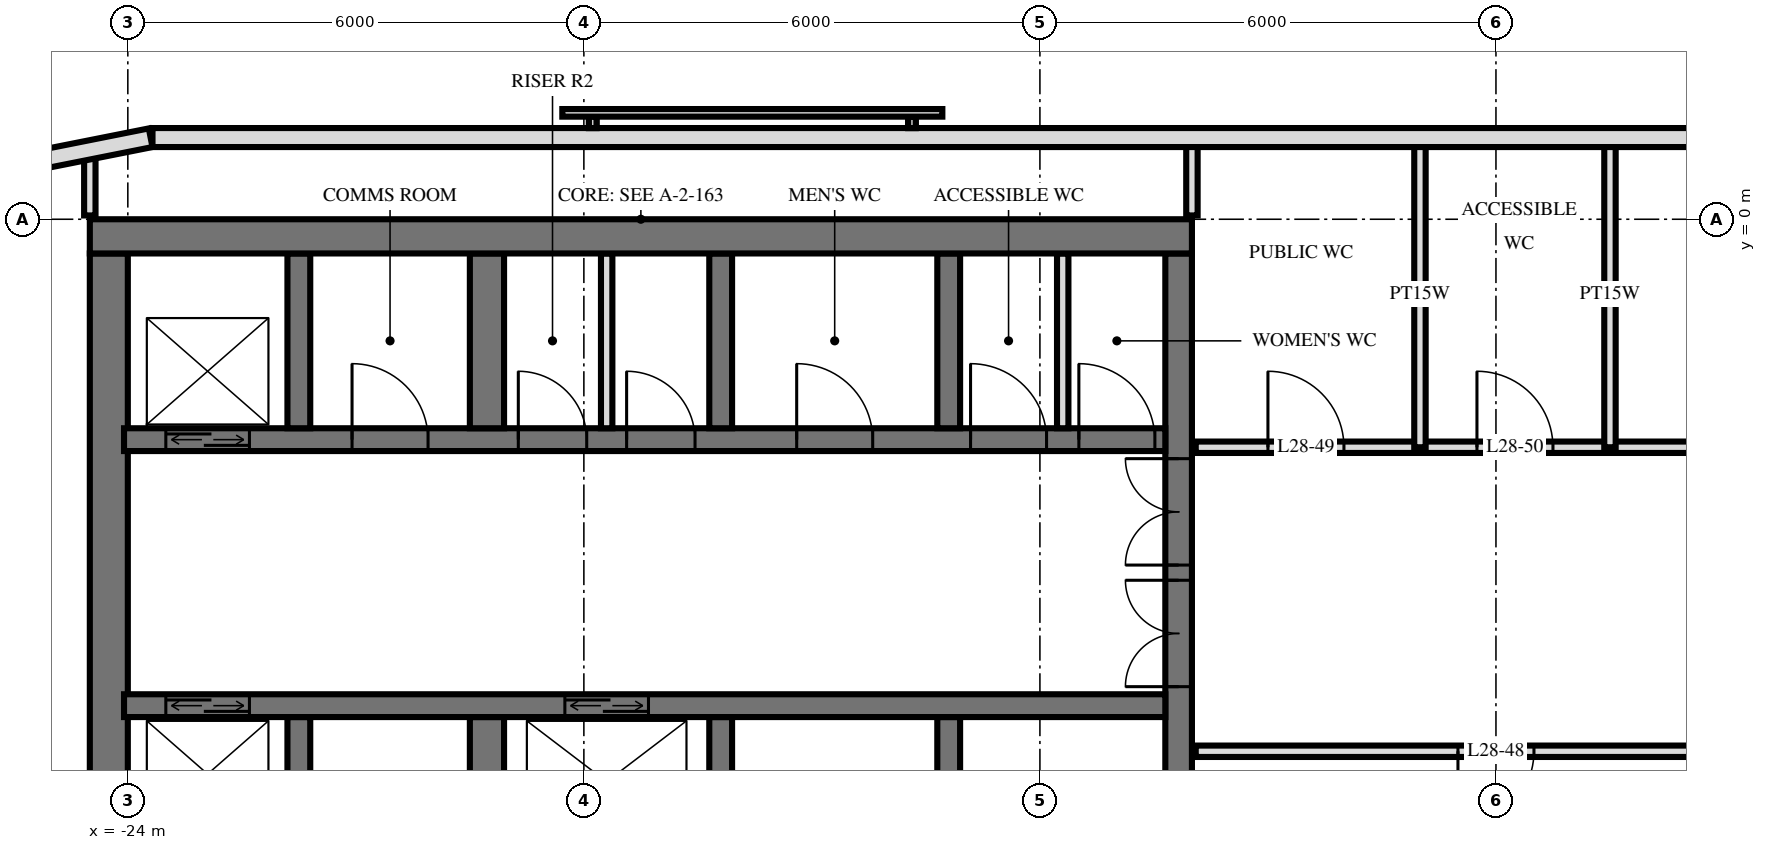
"""IFC4 building model, lengths in metres.
Left out: names, types, materials, properties, quantities, classifications, styles, units other than length and angle.
Written with IfcOpenShell. Run it as: python <this file> out.ifc"""

import sys

from ifc_helpers import new_model, si_unit, direction, frame, frame_2d, origin, place, context, subcontext, project, spatial, rectangle, extrude, element, fill, save


model = new_model("IFC4")
c1 = context("Model", 3, precision=1e-05, world=origin(), true_north=direction((0.0, 1.0)))
c2 = subcontext(c1, "Body", "Model", "MODEL_VIEW")
j1 = project(units=[si_unit("LENGTHUNIT", "METRE"), si_unit("PLANEANGLEUNIT", "RADIAN")], contexts=[c1])
p1 = place(None, origin())
s1 = spatial("IfcSite", under=j1, at=p1, CompositionType="ELEMENT")
p2 = place(p1, origin())
s2 = spatial("IfcBuilding", under=s1, at=p2, CompositionType="ELEMENT")
p3 = place(p2, frame((0.0, 0.0, 112.8)))
s3 = spatial("IfcBuildingStorey", under=s2, at=p3, CompositionType="ELEMENT", Elevation=112.8)
p4 = place(p3, frame((-24.5, -0.225, 0.0), z_axis=(0.0, 0.0, 1.0), x_axis=(1.0, 0.0, 0.0)))
e1 = element("IfcWall", 1, at=p4, inside=s3, PredefinedType="SHEAR", context=c2, shape_type="SweptSolid", body=[
    extrude(rectangle(XDim=14.5, YDim=0.45, at=frame_2d((7.25, 0.0))), origin(), (0.0, 0.0, 1.0), 3.6),
])
p5 = place(p3, frame((-10.175, -14.55, 0.0), z_axis=(0.0, 0.0, 1.0), x_axis=(0.0, 1.0, 0.0)))
e2 = element("IfcWall", 2, at=p5, inside=s3, PredefinedType="SHEAR", context=c2, shape_type="SweptSolid", body=[
    extrude(rectangle(XDim=14.1, YDim=0.35, at=frame_2d((7.05, 0.0))), origin(), (0.0, 0.0, 1.0), 3.6),
])
p6 = place(p5, frame((8.4, 0.0, 0.0)))
e3 = element("IfcOpeningElement", 3, at=p6, cuts=e2, PredefinedType="OPENING", context=c2, shape_type="SweptSolid", body=[
    extrude(rectangle(XDim=1.4, YDim=2.4, at=frame_2d((0.7, 1.2))), frame((0.0, 0.185, 0.0), z_axis=(0.0, -1.0, 0.0), x_axis=(1.0, 0.0, 0.0)), (0.0, 0.0, 1.0), 0.37),
])
p7 = place(p5, frame((10.0, 0.0, 0.0)))
e4 = element("IfcOpeningElement", 4, at=p7, cuts=e2, PredefinedType="OPENING", context=c2, shape_type="SweptSolid", body=[
    extrude(rectangle(XDim=1.4, YDim=2.4, at=frame_2d((0.7, 1.2))), frame((0.0, 0.185, 0.0), z_axis=(0.0, -1.0, 0.0), x_axis=(1.0, 0.0, 0.0)), (0.0, 0.0, 1.0), 0.37),
])
p8 = place(p5, frame((4.0, 0.0, 0.0)))
e5 = element("IfcOpeningElement", 5, at=p8, cuts=e2, PredefinedType="OPENING", context=c2, shape_type="SweptSolid", body=[
    extrude(rectangle(XDim=1.2, YDim=2.1, at=frame_2d((0.6, 1.05))), frame((0.0, 0.185, 0.0), z_axis=(0.0, -1.0, 0.0), x_axis=(1.0, 0.0, 0.0)), (0.0, 0.0, 1.0), 0.37),
])
p9 = place(p3, frame((-24.25, -14.55, 0.0), z_axis=(0.0, 0.0, 1.0), x_axis=(0.0, 1.0, 0.0)))
e6 = element("IfcWall", 6, at=p9, inside=s3, PredefinedType="SHEAR", context=c2, shape_type="SweptSolid", body=[
    extrude(rectangle(XDim=14.1, YDim=0.5, at=frame_2d((7.05, 0.0))), origin(), (0.0, 0.0, 1.0), 3.6),
])
p10 = place(p3, frame((-24.05, -2.9, 0.0), z_axis=(0.0, 0.0, 1.0), x_axis=(1.0, 0.0, 0.0)))
e7 = element("IfcWall", 7, at=p10, inside=s3, PredefinedType="SHEAR", context=c2, shape_type="SweptSolid", body=[
    extrude(rectangle(XDim=13.7, YDim=0.3, at=frame_2d((6.85, 0.0))), origin(), (0.0, 0.0, 1.0), 3.6),
])
p11 = place(p10, frame((0.55, 0.0, 0.0)))
e8 = element("IfcOpeningElement", 8, at=p11, cuts=e7, PredefinedType="OPENING", context=c2, shape_type="SweptSolid", body=[
    extrude(rectangle(XDim=1.1, YDim=2.1, at=frame_2d((0.55, 1.05))), frame((0.0, 0.16, 0.0), z_axis=(0.0, -1.0, 0.0), x_axis=(1.0, 0.0, 0.0)), (0.0, 0.0, 1.0), 0.32),
])
p12 = place(p10, frame((6.613, 0.0, 0.0)))
e9 = element("IfcOpeningElement", 9, at=p12, cuts=e7, PredefinedType="OPENING", context=c2, shape_type="SweptSolid", body=[
    extrude(rectangle(XDim=0.9, YDim=2.1, at=frame_2d((0.45, 1.05))), frame((0.0, 0.16, 0.0), z_axis=(0.0, -1.0, 0.0), x_axis=(1.0, 0.0, 0.0)), (0.0, 0.0, 1.0), 0.32),
])
p13 = place(p10, frame((5.188, 0.0, 0.0)))
e10 = element("IfcOpeningElement", 10, at=p13, cuts=e7, PredefinedType="OPENING", context=c2, shape_type="SweptSolid", body=[
    extrude(rectangle(XDim=0.9, YDim=2.1, at=frame_2d((0.45, 1.05))), frame((0.0, 0.16, 0.0), z_axis=(0.0, -1.0, 0.0), x_axis=(1.0, 0.0, 0.0)), (0.0, 0.0, 1.0), 0.32),
])
p14 = place(p10, frame((12.562, 0.0, 0.0)))
e11 = element("IfcOpeningElement", 11, at=p14, cuts=e7, PredefinedType="OPENING", context=c2, shape_type="SweptSolid", body=[
    extrude(rectangle(XDim=1.0, YDim=2.1, at=frame_2d((0.5, 1.05))), frame((0.0, 0.16, 0.0), z_axis=(0.0, -1.0, 0.0), x_axis=(1.0, 0.0, 0.0)), (0.0, 0.0, 1.0), 0.32),
])
p15 = place(p10, frame((11.137, 0.0, 0.0)))
e12 = element("IfcOpeningElement", 12, at=p15, cuts=e7, PredefinedType="OPENING", context=c2, shape_type="SweptSolid", body=[
    extrude(rectangle(XDim=1.0, YDim=2.1, at=frame_2d((0.5, 1.05))), frame((0.0, 0.16, 0.0), z_axis=(0.0, -1.0, 0.0), x_axis=(1.0, 0.0, 0.0)), (0.0, 0.0, 1.0), 0.32),
])
p16 = place(p10, frame((8.85, 0.0, 0.0)))
e13 = element("IfcOpeningElement", 13, at=p16, cuts=e7, PredefinedType="OPENING", context=c2, shape_type="SweptSolid", body=[
    extrude(rectangle(XDim=1.0, YDim=2.1, at=frame_2d((0.5, 1.05))), frame((0.0, 0.16, 0.0), z_axis=(0.0, -1.0, 0.0), x_axis=(1.0, 0.0, 0.0)), (0.0, 0.0, 1.0), 0.32),
])
p17 = place(p10, frame((3.0, 0.0, 0.0)))
e14 = element("IfcOpeningElement", 14, at=p17, cuts=e7, PredefinedType="OPENING", context=c2, shape_type="SweptSolid", body=[
    extrude(rectangle(XDim=1.0, YDim=2.1, at=frame_2d((0.5, 1.05))), frame((0.0, 0.16, 0.0), z_axis=(0.0, -1.0, 0.0), x_axis=(1.0, 0.0, 0.0)), (0.0, 0.0, 1.0), 0.32),
])
p18 = place(p3, frame((-24.05, -6.4, 0.0), z_axis=(0.0, 0.0, 1.0), x_axis=(1.0, 0.0, 0.0)))
e15 = element("IfcWall", 15, at=p18, inside=s3, PredefinedType="SHEAR", context=c2, shape_type="SweptSolid", body=[
    extrude(rectangle(XDim=13.7, YDim=0.3, at=frame_2d((6.85, 0.0))), origin(), (0.0, 0.0, 1.0), 3.6),
])
p19 = place(p18, frame((0.55, 0.0, 0.0)))
e16 = element("IfcOpeningElement", 16, at=p19, cuts=e15, PredefinedType="OPENING", context=c2, shape_type="SweptSolid", body=[
    extrude(rectangle(XDim=1.1, YDim=2.1, at=frame_2d((0.55, 1.05))), frame((0.0, 0.16, 0.0), z_axis=(0.0, -1.0, 0.0), x_axis=(1.0, 0.0, 0.0)), (0.0, 0.0, 1.0), 0.32),
])
p20 = place(p18, frame((5.8, 0.0, 0.0)))
e17 = element("IfcOpeningElement", 17, at=p20, cuts=e15, PredefinedType="OPENING", context=c2, shape_type="SweptSolid", body=[
    extrude(rectangle(XDim=1.1, YDim=2.1, at=frame_2d((0.55, 1.05))), frame((0.0, 0.16, 0.0), z_axis=(0.0, -1.0, 0.0), x_axis=(1.0, 0.0, 0.0)), (0.0, 0.0, 1.0), 0.32),
])
for number, where, z_axis, x_axis in (
    (18, (-13.2, -2.75, 0.0), (0.0, 0.0, 1.0), (0.0, 1.0, 0.0)),
    (19, (-13.2, -8.85, 0.0), (0.0, 0.0, 1.0), (0.0, 1.0, 0.0)),
    (20, (-16.2, -2.75, 0.0), (0.0, 0.0, 1.0), (0.0, 1.0, 0.0)),
    (21, (-16.2, -8.85, 0.0), (0.0, 0.0, 1.0), (0.0, 1.0, 0.0)),
):
    element("IfcWall", number, at=place(p3, frame(where, z_axis=z_axis, x_axis=x_axis)), inside=s3, PredefinedType="SHEAR", context=c2, shape_type="SweptSolid", body=[
        extrude(rectangle(XDim=2.3, YDim=0.3, at=frame_2d((1.15, 0.0))), origin(), (0.0, 0.0, 1.0), 3.6),
    ])
for number, where, z_axis, x_axis in (
    (22, (-19.275, -2.75, 0.0), (0.0, 0.0, 1.0), (0.0, 1.0, 0.0)),
    (23, (-19.275, -8.85, 0.0), (0.0, 0.0, 1.0), (0.0, 1.0, 0.0)),
):
    element("IfcWall", number, at=place(p3, frame(where, z_axis=z_axis, x_axis=x_axis)), inside=s3, PredefinedType="SHEAR", context=c2, shape_type="SweptSolid", body=[
        extrude(rectangle(XDim=2.3, YDim=0.45, at=frame_2d((1.15, 0.0))), origin(), (0.0, 0.0, 1.0), 3.6),
    ])
for number, where, z_axis, x_axis in (
    (24, (-21.75, -2.75, 0.0), (0.0, 0.0, 1.0), (0.0, 1.0, 0.0)),
    (25, (-21.75, -8.85, 0.0), (0.0, 0.0, 1.0), (0.0, 1.0, 0.0)),
):
    element("IfcWall", number, at=place(p3, frame(where, z_axis=z_axis, x_axis=x_axis)), inside=s3, PredefinedType="SHEAR", context=c2, shape_type="SweptSolid", body=[
        extrude(rectangle(XDim=2.3, YDim=0.3, at=frame_2d((1.15, 0.0))), origin(), (0.0, 0.0, 1.0), 3.6),
    ])
p21 = place(p3, frame((23.675, 1.075, 0.0), z_axis=(0.0, 0.0, 1.0), x_axis=(-1.0, 0.0, 0.0)))
e26 = element("IfcWall", 26, at=p21, inside=s3, PredefinedType="SOLIDWALL", context=c2, shape_type="SweptSolid", body=[
    extrude(rectangle(XDim=47.351, YDim=0.25, at=frame_2d((23.675, 0.0))), origin(), (0.0, 0.0, 1.0), 3.32),
])
p22 = place(p21, frame((15.275, 0.0, 0.3)))
e27 = element("IfcOpeningElement", 27, at=p22, cuts=e26, PredefinedType="OPENING", context=c2, shape_type="SweptSolid", body=[
    extrude(rectangle(XDim=2.4, YDim=2.1, at=frame_2d((1.2, 1.05))), frame((0.0, 0.135, 0.0), z_axis=(0.0, -1.0, 0.0), x_axis=(1.0, 0.0, 0.0)), (0.0, 0.0, 1.0), 0.27),
])
p23 = place(p21, frame((18.275, 0.0, 0.3)))
e28 = element("IfcOpeningElement", 28, at=p23, cuts=e26, PredefinedType="OPENING", context=c2, shape_type="SweptSolid", body=[
    extrude(rectangle(XDim=2.4, YDim=2.1, at=frame_2d((1.2, 1.05))), frame((0.0, 0.135, 0.0), z_axis=(0.0, -1.0, 0.0), x_axis=(1.0, 0.0, 0.0)), (0.0, 0.0, 1.0), 0.27),
])
p24 = place(p21, frame((24.275, 0.0, 0.3)))
e29 = element("IfcOpeningElement", 29, at=p24, cuts=e26, PredefinedType="OPENING", context=c2, shape_type="SweptSolid", body=[
    extrude(rectangle(XDim=2.4, YDim=2.1, at=frame_2d((1.2, 1.05))), frame((0.0, 0.135, 0.0), z_axis=(0.0, -1.0, 0.0), x_axis=(1.0, 0.0, 0.0)), (0.0, 0.0, 1.0), 0.27),
])
p25 = place(p3, frame((-23.7, 1.073, 0.0), z_axis=(0.0, 0.0, 1.0), x_axis=(-0.980803419081, -0.194999110559, 0.0)))
e30 = element("IfcWall", 30, at=p25, inside=s3, PredefinedType="SOLIDWALL", context=c2, shape_type="SweptSolid", body=[
    extrude(rectangle(XDim=1.681, YDim=0.25, at=frame_2d((0.841, 0.0))), origin(), (0.0, 0.0, 1.0), 3.32),
])
for number, where, z_axis, x_axis in (
    (31, (-17.7, -2.75, 0.0), (0.0, 0.0, 1.0), (0.0, 1.0, 0.0)),
    (32, (-11.7, -2.75, 0.0), (0.0, 0.0, 1.0), (0.0, 1.0, 0.0)),
):
    element("IfcWall", number, at=place(p3, frame(where, z_axis=z_axis, x_axis=x_axis)), inside=s3, PredefinedType="PARTITIONING", context=c2, shape_type="SweptSolid", body=[
        extrude(rectangle(XDim=2.3, YDim=0.15, at=frame_2d((1.15, 0.0))), origin(), (0.0, 0.0, 1.0), 3.3),
    ])
for number, where, z_axis, x_axis in (
    (33, (-4.5, -3.0, 0.0), (0.0, 0.0, 1.0), (0.0, 1.0, 0.0)),
    (34, (-7.0, -3.0, 0.0), (0.0, 0.0, 1.0), (0.0, 1.0, 0.0)),
):
    element("IfcWall", number, at=place(p3, frame(where, z_axis=z_axis, x_axis=x_axis)), inside=s3, PredefinedType="PLUMBINGWALL", context=c2, shape_type="SweptSolid", body=[
        extrude(rectangle(XDim=4.02, YDim=0.15, at=frame_2d((2.01, 0.0))), origin(), (0.0, 0.0, 1.0), 3.32),
    ])
p26 = place(p3, frame((-10.0, 0.05, 0.0), z_axis=(0.0, 0.0, 1.0), x_axis=(0.0, 1.0, 0.0)))
e35 = element("IfcWall", 35, at=p26, inside=s3, PredefinedType="PLUMBINGWALL", context=c2, shape_type="SweptSolid", body=[
    extrude(rectangle(XDim=0.97, YDim=0.15, at=frame_2d((0.485, 0.0))), origin(), (0.0, 0.0, 1.0), 3.32),
])
p27 = place(p3, frame((-24.5, 0.05, 0.0), z_axis=(0.0, 0.0, 1.0), x_axis=(0.0, 1.0, 0.0)))
e36 = element("IfcWall", 36, at=p27, inside=s3, PredefinedType="PARTITIONING", context=c2, shape_type="SweptSolid", body=[
    extrude(rectangle(XDim=0.807, YDim=0.15, at=frame_2d((0.404, 0.0))), origin(), (0.0, 0.0, 1.0), 3.32),
])
p28 = place(p3, frame((-9.95, -7.0, 0.0), z_axis=(0.0, 0.0, 1.0), x_axis=(1.0, 0.0, 0.0)))
e37 = element("IfcWall", 37, at=p28, inside=s3, PredefinedType="PARTITIONING", context=c2, shape_type="SweptSolid", body=[
    extrude(rectangle(XDim=19.9, YDim=0.15, at=frame_2d((9.95, 0.0))), origin(), (0.0, 0.0, 1.0), 3.32),
])
p29 = place(p28, frame((9.45, 0.0, 0.0)))
e38 = element("IfcOpeningElement", 38, at=p29, cuts=e37, PredefinedType="OPENING", context=c2, shape_type="SweptSolid", body=[
    extrude(rectangle(XDim=1.0, YDim=2.1, at=frame_2d((0.5, 1.05))), frame((0.0, 0.085, 0.0), z_axis=(0.0, -1.0, 0.0), x_axis=(1.0, 0.0, 0.0)), (0.0, 0.0, 1.0), 0.17),
])
p30 = place(p28, frame((3.45, 0.0, 0.0)))
e39 = element("IfcOpeningElement", 39, at=p30, cuts=e37, PredefinedType="OPENING", context=c2, shape_type="SweptSolid", body=[
    extrude(rectangle(XDim=1.0, YDim=2.1, at=frame_2d((0.5, 1.05))), frame((0.0, 0.085, 0.0), z_axis=(0.0, -1.0, 0.0), x_axis=(1.0, 0.0, 0.0)), (0.0, 0.0, 1.0), 0.17),
])
p31 = place(p3, frame((-9.95, -3.0, 0.0), z_axis=(0.0, 0.0, 1.0), x_axis=(1.0, 0.0, 0.0)))
e40 = element("IfcWall", 40, at=p31, inside=s3, PredefinedType="PARTITIONING", context=c2, shape_type="SweptSolid", body=[
    extrude(rectangle(XDim=19.9, YDim=0.15, at=frame_2d((9.95, 0.0))), origin(), (0.0, 0.0, 1.0), 3.32),
])
p32 = place(p31, frame((0.95, 0.0, 0.0)))
e41 = element("IfcOpeningElement", 41, at=p32, cuts=e40, PredefinedType="OPENING", context=c2, shape_type="SweptSolid", body=[
    extrude(rectangle(XDim=1.0, YDim=2.1, at=frame_2d((0.5, 1.05))), frame((0.0, 0.085, 0.0), z_axis=(0.0, -1.0, 0.0), x_axis=(1.0, 0.0, 0.0)), (0.0, 0.0, 1.0), 0.17),
])
p33 = place(p31, frame((3.7, 0.0, 0.0)))
e42 = element("IfcOpeningElement", 42, at=p33, cuts=e40, PredefinedType="OPENING", context=c2, shape_type="SweptSolid", body=[
    extrude(rectangle(XDim=1.0, YDim=2.1, at=frame_2d((0.5, 1.05))), frame((0.0, 0.085, 0.0), z_axis=(0.0, -1.0, 0.0), x_axis=(1.0, 0.0, 0.0)), (0.0, 0.0, 1.0), 0.17),
])
p34 = place(p31, frame((8.45, 0.0, 0.0)))
e43 = element("IfcOpeningElement", 43, at=p34, cuts=e40, PredefinedType="OPENING", context=c2, shape_type="SweptSolid", body=[
    extrude(rectangle(XDim=1.0, YDim=2.1, at=frame_2d((0.5, 1.05))), frame((0.0, 0.085, 0.0), z_axis=(0.0, -1.0, 0.0), x_axis=(1.0, 0.0, 0.0)), (0.0, 0.0, 1.0), 0.17),
])
p35 = place(p31, frame((15.7, 0.0, 0.0)))
e44 = element("IfcOpeningElement", 44, at=p35, cuts=e40, PredefinedType="OPENING", context=c2, shape_type="SweptSolid", body=[
    extrude(rectangle(XDim=1.0, YDim=2.1, at=frame_2d((0.5, 1.05))), frame((0.0, 0.085, 0.0), z_axis=(0.0, -1.0, 0.0), x_axis=(1.0, 0.0, 0.0)), (0.0, 0.0, 1.0), 0.17),
])
p36 = place(p11, origin())
e45 = element("IfcDoor", 45, at=p36, inside=s3, OperationType="DOUBLE_DOOR_SLIDING", PredefinedType="USERDEFINED", context=c2, shape_type="SweptSolid", body=[
    extrude(rectangle(XDim=1.1, YDim=2.1, at=frame_2d((0.55, 1.05))), frame((0.0, 0.025, 0.0), z_axis=(0.0, -1.0, 0.0), x_axis=(1.0, 0.0, 0.0)), (0.0, 0.0, 1.0), 0.05),
])
fill(e8, e45)
p37 = place(p19, origin())
e46 = element("IfcDoor", 46, at=p37, inside=s3, OperationType="DOUBLE_DOOR_SLIDING", PredefinedType="USERDEFINED", context=c2, shape_type="SweptSolid", body=[
    extrude(rectangle(XDim=1.1, YDim=2.1, at=frame_2d((0.55, 1.05))), frame((0.0, 0.025, 0.0), z_axis=(0.0, -1.0, 0.0), x_axis=(1.0, 0.0, 0.0)), (0.0, 0.0, 1.0), 0.05),
])
fill(e16, e46)
p38 = place(p20, origin())
e47 = element("IfcDoor", 47, at=p38, inside=s3, OperationType="DOUBLE_DOOR_SLIDING", PredefinedType="USERDEFINED", context=c2, shape_type="SweptSolid", body=[
    extrude(rectangle(XDim=1.1, YDim=2.1, at=frame_2d((0.55, 1.05))), frame((0.0, 0.025, 0.0), z_axis=(0.0, -1.0, 0.0), x_axis=(1.0, 0.0, 0.0)), (0.0, 0.0, 1.0), 0.05),
])
fill(e17, e47)
p39 = place(p6, origin())
e48 = element("IfcDoor", 48, at=p39, inside=s3, OperationType="DOUBLE_DOOR_SINGLE_SWING", PredefinedType="DOOR", context=c2, shape_type="SweptSolid", body=[
    extrude(rectangle(XDim=1.4, YDim=2.4, at=frame_2d((0.7, 1.2))), frame((0.0, 0.025, 0.0), z_axis=(0.0, -1.0, 0.0), x_axis=(1.0, 0.0, 0.0)), (0.0, 0.0, 1.0), 0.05),
])
fill(e3, e48)
p40 = place(p7, origin())
e49 = element("IfcDoor", 49, at=p40, inside=s3, OperationType="DOUBLE_DOOR_SINGLE_SWING", PredefinedType="DOOR", context=c2, shape_type="SweptSolid", body=[
    extrude(rectangle(XDim=1.4, YDim=2.4, at=frame_2d((0.7, 1.2))), frame((0.0, 0.025, 0.0), z_axis=(0.0, -1.0, 0.0), x_axis=(1.0, 0.0, 0.0)), (0.0, 0.0, 1.0), 0.05),
])
fill(e4, e49)
p41 = place(p12, origin())
e50 = element("IfcDoor", 50, at=p41, inside=s3, OperationType="SINGLE_SWING_RIGHT", PredefinedType="DOOR", context=c2, shape_type="SweptSolid", body=[
    extrude(rectangle(XDim=0.9, YDim=2.1, at=frame_2d((0.45, 1.05))), frame((0.0, 0.025, 0.0), z_axis=(0.0, -1.0, 0.0), x_axis=(1.0, 0.0, 0.0)), (0.0, 0.0, 1.0), 0.05),
])
fill(e9, e50)
p42 = place(p13, origin())
e51 = element("IfcDoor", 51, at=p42, inside=s3, OperationType="SINGLE_SWING_RIGHT", PredefinedType="DOOR", context=c2, shape_type="SweptSolid", body=[
    extrude(rectangle(XDim=0.9, YDim=2.1, at=frame_2d((0.45, 1.05))), frame((0.0, 0.025, 0.0), z_axis=(0.0, -1.0, 0.0), x_axis=(1.0, 0.0, 0.0)), (0.0, 0.0, 1.0), 0.05),
])
fill(e10, e51)
p43 = place(p14, origin())
e52 = element("IfcDoor", 52, at=p43, inside=s3, OperationType="SINGLE_SWING_RIGHT", PredefinedType="DOOR", context=c2, shape_type="SweptSolid", body=[
    extrude(rectangle(XDim=1.0, YDim=2.1, at=frame_2d((0.5, 1.05))), frame((0.0, 0.025, 0.0), z_axis=(0.0, -1.0, 0.0), x_axis=(1.0, 0.0, 0.0)), (0.0, 0.0, 1.0), 0.05),
])
fill(e11, e52)
p44 = place(p15, origin())
e53 = element("IfcDoor", 53, at=p44, inside=s3, OperationType="SINGLE_SWING_RIGHT", PredefinedType="DOOR", context=c2, shape_type="SweptSolid", body=[
    extrude(rectangle(XDim=1.0, YDim=2.1, at=frame_2d((0.5, 1.05))), frame((0.0, 0.025, 0.0), z_axis=(0.0, -1.0, 0.0), x_axis=(1.0, 0.0, 0.0)), (0.0, 0.0, 1.0), 0.05),
])
fill(e12, e53)
p45 = place(p16, origin())
e54 = element("IfcDoor", 54, at=p45, inside=s3, OperationType="SINGLE_SWING_RIGHT", PredefinedType="DOOR", context=c2, shape_type="SweptSolid", body=[
    extrude(rectangle(XDim=1.0, YDim=2.1, at=frame_2d((0.5, 1.05))), frame((0.0, 0.025, 0.0), z_axis=(0.0, -1.0, 0.0), x_axis=(1.0, 0.0, 0.0)), (0.0, 0.0, 1.0), 0.05),
])
fill(e13, e54)
p46 = place(p17, origin())
e55 = element("IfcDoor", 55, at=p46, inside=s3, OperationType="SINGLE_SWING_RIGHT", PredefinedType="DOOR", context=c2, shape_type="SweptSolid", body=[
    extrude(rectangle(XDim=1.0, YDim=2.1, at=frame_2d((0.5, 1.05))), frame((0.0, 0.025, 0.0), z_axis=(0.0, -1.0, 0.0), x_axis=(1.0, 0.0, 0.0)), (0.0, 0.0, 1.0), 0.05),
])
fill(e14, e55)
p47 = place(p30, frame((0.5, 0.0, 0.0), z_axis=(0.0, 0.0, 1.0), x_axis=(-1.0, 0.0, 0.0)))
e56 = element("IfcDoor", 56, at=p47, inside=s3, OperationType="SINGLE_SWING_LEFT", PredefinedType="DOOR", context=c2, shape_type="SweptSolid", body=[
    extrude(rectangle(XDim=1.0, YDim=2.1, at=frame_2d((0.0, 1.05))), frame((0.0, -0.025, 0.0), z_axis=(0.0, 1.0, 0.0), x_axis=(-1.0, 0.0, 0.0)), (0.0, 0.0, 1.0), 0.05),
])
fill(e39, e56)
p48 = place(p32, origin())
e57 = element("IfcDoor", 57, at=p48, inside=s3, OperationType="SINGLE_SWING_RIGHT", PredefinedType="DOOR", context=c2, shape_type="SweptSolid", body=[
    extrude(rectangle(XDim=1.0, YDim=2.1, at=frame_2d((0.5, 1.05))), frame((0.0, 0.025, 0.0), z_axis=(0.0, -1.0, 0.0), x_axis=(1.0, 0.0, 0.0)), (0.0, 0.0, 1.0), 0.05),
])
fill(e41, e57)
p49 = place(p33, origin())
e58 = element("IfcDoor", 58, at=p49, inside=s3, OperationType="SINGLE_SWING_RIGHT", PredefinedType="DOOR", context=c2, shape_type="SweptSolid", body=[
    extrude(rectangle(XDim=1.0, YDim=2.1, at=frame_2d((0.5, 1.05))), frame((0.0, 0.025, 0.0), z_axis=(0.0, -1.0, 0.0), x_axis=(1.0, 0.0, 0.0)), (0.0, 0.0, 1.0), 0.05),
])
fill(e42, e58)
save(model, sys.argv[1])
